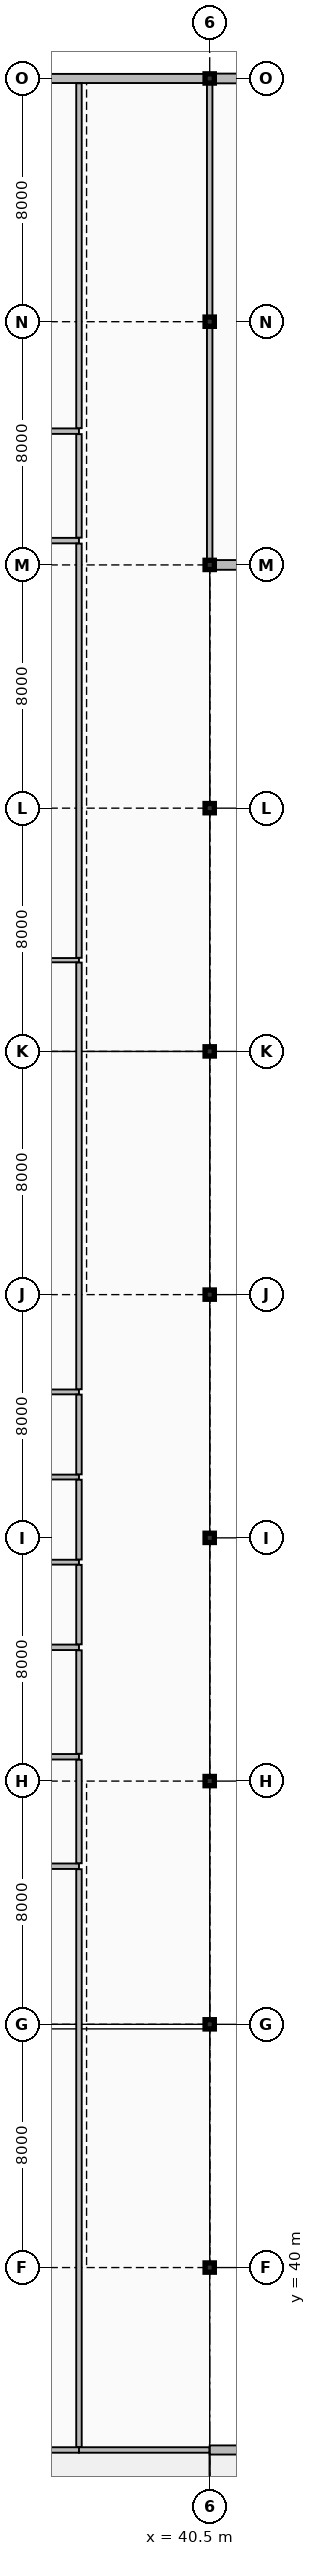
"""IFC4 building model, lengths in metres.
Left out: names, types, materials, properties, quantities, classifications, styles, units other than length and angle.
Written with IfcOpenShell. Run it as: python <this file> out.ifc"""

import sys

from ifc_helpers import new_model, si_unit, direction, frame, frame_2d, origin, origin_2d, place, context, subcontext, project, spatial, rectangle, hollow_rectangle, extrude, element, fill, save


model = new_model("IFC4")
c1 = context("Model", 3, precision=1e-05, world=origin(), true_north=direction((0.0, 1.0)))
c2 = subcontext(c1, "Body", "Model", "MODEL_VIEW")
j1 = project(units=[si_unit("LENGTHUNIT", "METRE"), si_unit("PLANEANGLEUNIT", "RADIAN")], contexts=[c1])
p1 = place(None, origin())
s1 = spatial("IfcSite", under=j1, at=p1, CompositionType="ELEMENT")
p2 = place(p1, origin())
s2 = spatial("IfcBuilding", under=s1, at=p2, CompositionType="ELEMENT")
p3 = place(p2, frame((0.0, 0.0, 19.8)))
s3 = spatial("IfcBuildingStorey", under=s2, at=p3, CompositionType="ELEMENT", Elevation=19.8)
p4 = place(p3, frame((40.5, 40.0, 0.0), z_axis=(0.0, 0.0, 1.0), x_axis=(1.0, 0.0, 0.0)))
e1 = element("IfcColumn", 1, at=p4, inside=s3, PredefinedType="COLUMN", context=c2, shape_type="SweptSolid", body=[
    extrude(hollow_rectangle(XDim=0.305, YDim=0.305, WallThickness=0.016, InnerFilletRadius=0.016, OuterFilletRadius=0.032, at=origin_2d()), origin(), (0.0, 0.0, 1.0), 4.76),
])
for number, where, z_axis, x_axis in (
    (2, (40.5, 48.0, 0.0), (0.0, 0.0, 1.0), (1.0, 0.0, 0.0)),
    (3, (40.5, 56.0, 0.0), (0.0, 0.0, 1.0), (1.0, 0.0, 0.0)),
    (4, (40.5, 64.0, 0.0), (0.0, 0.0, 1.0), (1.0, 0.0, 0.0)),
    (5, (40.5, 72.0, 0.0), (0.0, 0.0, 1.0), (1.0, 0.0, 0.0)),
    (6, (40.5, 80.0, 0.0), (0.0, 0.0, 1.0), (1.0, 0.0, 0.0)),
    (7, (40.5, 88.0, 0.0), (0.0, 0.0, 1.0), (1.0, 0.0, 0.0)),
    (8, (40.5, 96.0, 0.0), (0.0, 0.0, 1.0), (1.0, 0.0, 0.0)),
    (9, (40.5, 104.0, 0.0), (0.0, 0.0, 1.0), (1.0, 0.0, 0.0)),
    (10, (40.5, 112.0, 0.0), (0.0, 0.0, 1.0), (1.0, 0.0, 0.0)),
):
    element("IfcColumn", number, at=place(p3, frame(where, z_axis=z_axis, x_axis=x_axis)), inside=s3, PredefinedType="COLUMN", context=c2, shape_type="SweptSolid", body=[
        extrude(hollow_rectangle(XDim=0.305, YDim=0.305, WallThickness=0.016, InnerFilletRadius=0.016, OuterFilletRadius=0.032, at=origin_2d()), origin(), (0.0, 0.0, 1.0), 5.1),
    ])
p5 = place(p3, frame((48.42, 34.0, 0.0), z_axis=(0.0, 0.0, 1.0), x_axis=(-1.0, 0.0, 0.0)))
e11 = element("IfcWall", 11, at=p5, inside=s3, PredefinedType="SOLIDWALL", context=c2, shape_type="SweptSolid", body=[
    extrude(rectangle(XDim=7.92, YDim=0.3, at=frame_2d((3.96, 0.0))), origin(), (0.0, 0.0, 1.0), 4.092),
])
p6 = place(p5, frame((2.7, 0.0, 0.95)))
e12 = element("IfcOpeningElement", 12, at=p6, cuts=e11, PredefinedType="OPENING", context=c2, shape_type="SweptSolid", body=[
    extrude(rectangle(XDim=2.7, YDim=0.9, at=frame_2d((1.35, 0.45))), frame((0.0, 0.16, 0.0), z_axis=(0.0, -1.0, 0.0), x_axis=(1.0, 0.0, 0.0)), (0.0, 0.0, 1.0), 0.32),
])
p7 = place(p3, frame((40.5, 96.0, 0.0), z_axis=(0.0, 0.0, 1.0), x_axis=(1.0, 0.0, 0.0)))
e13 = element("IfcWall", 13, at=p7, inside=s3, PredefinedType="SOLIDWALL", context=c2, shape_type="SweptSolid", body=[
    extrude(rectangle(XDim=5.7, YDim=0.32, at=frame_2d((2.85, 0.0))), origin(), (0.0, 0.0, 1.0), 4.302),
])
p8 = place(p3, frame((46.2, 112.0, 0.0), z_axis=(0.0, 0.0, 1.0), x_axis=(-1.0, 0.0, 0.0)))
e14 = element("IfcWall", 14, at=p8, inside=s3, PredefinedType="SOLIDWALL", context=c2, shape_type="SweptSolid", body=[
    extrude(rectangle(XDim=5.7, YDim=0.32, at=frame_2d((2.85, 0.0))), origin(), (0.0, 0.0, 1.0), 4.389),
])
p9 = place(p8, frame((2.25, 0.0, 0.85)))
e15 = element("IfcOpeningElement", 15, at=p9, cuts=e14, PredefinedType="OPENING", context=c2, shape_type="SweptSolid", body=[
    extrude(rectangle(XDim=0.9, YDim=2.1, at=frame_2d((0.45, 1.05))), frame((0.0, 0.17, 0.0), z_axis=(0.0, -1.0, 0.0), x_axis=(1.0, 0.0, 0.0)), (0.0, 0.0, 1.0), 0.34),
])
p10 = place(p3, frame((40.5, 112.0, 0.0), z_axis=(0.0, 0.0, 1.0), x_axis=(-1.0, 0.0, 0.0)))
e16 = element("IfcWall", 16, at=p10, inside=s3, PredefinedType="SOLIDWALL", context=c2, shape_type="SweptSolid", body=[
    extrude(rectangle(XDim=12.15, YDim=0.3, at=frame_2d((6.075, 0.0))), origin(), (0.0, 0.0, 1.0), 4.302),
])
p11 = place(p10, frame((5.4, 0.0, 0.85)))
e17 = element("IfcOpeningElement", 17, at=p11, cuts=e16, PredefinedType="OPENING", context=c2, shape_type="SweptSolid", body=[
    extrude(rectangle(XDim=0.9, YDim=2.4, at=frame_2d((0.45, 1.2))), frame((0.0, 0.16, 0.0), z_axis=(0.0, -1.0, 0.0), x_axis=(1.0, 0.0, 0.0)), (0.0, 0.0, 1.0), 0.32),
])
p12 = place(p3, frame((30.347, 34.0, 0.0), z_axis=(0.0, 0.0, 1.0), x_axis=(1.0, 0.0, 0.0)))
e18 = element("IfcWall", 18, at=p12, inside=s3, PredefinedType="PARTITIONING", context=c2, shape_type="SweptSolid", body=[
    extrude(rectangle(XDim=5.853, YDim=0.18, at=frame_2d((2.926, 0.0))), origin(), (0.0, 0.0, 1.0), 4.092),
])
p13 = place(p3, frame((29.586, 53.2, 0.0), z_axis=(0.0, 0.0, 1.0), x_axis=(1.0, 0.0, 0.0)))
e19 = element("IfcWall", 19, at=p13, inside=s3, PredefinedType="PARTITIONING", context=c2, shape_type="SweptSolid", body=[
    extrude(rectangle(XDim=6.614, YDim=0.18, at=frame_2d((3.307, 0.0))), origin(), (0.0, 0.0, 1.0), 4.86),
])
p14 = place(p3, frame((29.586, 83.0, 0.0), z_axis=(0.0, 0.0, 1.0), x_axis=(1.0, 0.0, 0.0)))
e20 = element("IfcWall", 20, at=p14, inside=s3, PredefinedType="PARTITIONING", context=c2, shape_type="SweptSolid", body=[
    extrude(rectangle(XDim=6.614, YDim=0.14, at=frame_2d((3.307, 0.0))), origin(), (0.0, 0.0, 1.0), 4.86),
])
p15 = place(p3, frame((29.2, 96.8, 0.0), z_axis=(0.0, 0.0, 1.0), x_axis=(1.0, 0.0, 0.0)))
e21 = element("IfcWall", 21, at=p15, inside=s3, PredefinedType="PARTITIONING", context=c2, shape_type="SweptSolid", body=[
    extrude(rectangle(XDim=7.0, YDim=0.18, at=frame_2d((3.5, 0.0))), origin(), (0.0, 0.0, 1.0), 4.86),
])
p16 = place(p3, frame((29.45, 100.4, 0.0), z_axis=(0.0, 0.0, 1.0), x_axis=(1.0, 0.0, 0.0)))
e22 = element("IfcWall", 22, at=p16, inside=s3, PredefinedType="PARTITIONING", context=c2, shape_type="SweptSolid", body=[
    extrude(rectangle(XDim=6.75, YDim=0.18, at=frame_2d((3.375, 0.0))), origin(), (0.0, 0.0, 1.0), 4.86),
])
p17 = place(p3, frame((31.8, 56.8, 0.0), z_axis=(0.0, 0.0, 1.0), x_axis=(1.0, 0.0, 0.0)))
e23 = element("IfcWall", 23, at=p17, inside=s3, PredefinedType="PARTITIONING", context=c2, shape_type="SweptSolid", body=[
    extrude(rectangle(XDim=4.4, YDim=0.18, at=frame_2d((2.2, 0.0))), origin(), (0.0, 0.0, 1.0), 4.86),
])
p18 = place(p3, frame((32.05, 60.4, 0.0), z_axis=(0.0, 0.0, 1.0), x_axis=(1.0, 0.0, 0.0)))
e24 = element("IfcWall", 24, at=p18, inside=s3, PredefinedType="PARTITIONING", context=c2, shape_type="SweptSolid", body=[
    extrude(rectangle(XDim=4.15, YDim=0.18, at=frame_2d((2.075, 0.0))), origin(), (0.0, 0.0, 1.0), 4.86),
])
for number, where, z_axis, x_axis in (
    (25, (32.058, 63.2, 0.0), (0.0, 0.0, 1.0), (1.0, 0.0, 0.0)),
    (26, (32.058, 66.0, 0.0), (0.0, 0.0, 1.0), (1.0, 0.0, 0.0)),
):
    element("IfcWall", number, at=place(p3, frame(where, z_axis=z_axis, x_axis=x_axis)), inside=s3, PredefinedType="PARTITIONING", context=c2, shape_type="SweptSolid", body=[
        extrude(rectangle(XDim=4.142, YDim=0.16, at=frame_2d((2.071, 0.0))), origin(), (0.0, 0.0, 1.0), 4.86),
    ])
p19 = place(p3, frame((32.05, 68.8, 0.0), z_axis=(0.0, 0.0, 1.0), x_axis=(1.0, 0.0, 0.0)))
e27 = element("IfcWall", 27, at=p19, inside=s3, PredefinedType="PARTITIONING", context=c2, shape_type="SweptSolid", body=[
    extrude(rectangle(XDim=4.15, YDim=0.16, at=frame_2d((2.075, 0.0))), origin(), (0.0, 0.0, 1.0), 4.86),
])
p20 = place(p3, frame((36.2, 34.0, 0.0), z_axis=(0.0, 0.0, 1.0), x_axis=(1.0, 0.0, 0.0)))
e28 = element("IfcWall", 28, at=p20, inside=s3, PredefinedType="PARTITIONING", context=c2, shape_type="SweptSolid", body=[
    extrude(rectangle(XDim=4.29, YDim=0.18, at=frame_2d((2.145, 0.0))), origin(), (0.0, 0.0, 1.0), 4.092),
])
p21 = place(p20, frame((1.545, 0.0, 0.0)))
e29 = element("IfcOpeningElement", 29, at=p21, cuts=e28, PredefinedType="OPENING", context=c2, shape_type="SweptSolid", body=[
    extrude(rectangle(XDim=1.2, YDim=2.2, at=frame_2d((0.6, 1.1))), frame((0.0, 0.1, 0.0), z_axis=(0.0, -1.0, 0.0), x_axis=(1.0, 0.0, 0.0)), (0.0, 0.0, 1.0), 0.2),
])
p22 = place(p3, frame((36.2, 34.098, 0.0), z_axis=(0.0, 0.0, 1.0), x_axis=(0.0, 1.0, 0.0)))
e30 = element("IfcWall", 30, at=p22, inside=s3, PredefinedType="PARTITIONING", context=c2, shape_type="SweptSolid", body=[
    extrude(rectangle(XDim=19.004, YDim=0.18, at=frame_2d((9.502, 0.0))), origin(), (0.0, 0.0, 1.0), 4.405),
])
p23 = place(p22, frame((9.002, 0.0, 0.0)))
e31 = element("IfcOpeningElement", 31, at=p23, cuts=e30, PredefinedType="OPENING", context=c2, shape_type="SweptSolid", body=[
    extrude(rectangle(XDim=1.0, YDim=2.2, at=frame_2d((0.5, 1.1))), frame((0.0, 0.1, 0.0), z_axis=(0.0, -1.0, 0.0), x_axis=(1.0, 0.0, 0.0)), (0.0, 0.0, 1.0), 0.2),
])
p24 = place(p3, frame((36.2, 53.298, 0.0), z_axis=(0.0, 0.0, 1.0), x_axis=(0.0, 1.0, 0.0)))
e32 = element("IfcWall", 32, at=p24, inside=s3, PredefinedType="PARTITIONING", context=c2, shape_type="SweptSolid", body=[
    extrude(rectangle(XDim=3.404, YDim=0.18, at=frame_2d((1.702, 0.0))), origin(), (0.0, 0.0, 1.0), 4.405),
])
p25 = place(p24, frame((1.152, 0.0, 0.0)))
e33 = element("IfcOpeningElement", 33, at=p25, cuts=e32, PredefinedType="OPENING", context=c2, shape_type="SweptSolid", body=[
    extrude(rectangle(XDim=1.1, YDim=2.2, at=frame_2d((0.55, 1.1))), frame((0.0, 0.1, 0.0), z_axis=(0.0, -1.0, 0.0), x_axis=(1.0, 0.0, 0.0)), (0.0, 0.0, 1.0), 0.2),
])
p26 = place(p3, frame((36.2, 56.898, 0.0), z_axis=(0.0, 0.0, 1.0), x_axis=(0.0, 1.0, 0.0)))
e34 = element("IfcWall", 34, at=p26, inside=s3, PredefinedType="PARTITIONING", context=c2, shape_type="SweptSolid", body=[
    extrude(rectangle(XDim=3.404, YDim=0.18, at=frame_2d((1.702, 0.0))), origin(), (0.0, 0.0, 1.0), 4.86),
])
p27 = place(p26, frame((1.202, 0.0, 0.0)))
e35 = element("IfcOpeningElement", 35, at=p27, cuts=e34, PredefinedType="OPENING", context=c2, shape_type="SweptSolid", body=[
    extrude(rectangle(XDim=1.0, YDim=2.15, at=frame_2d((0.5, 1.075))), frame((0.0, 0.1, 0.0), z_axis=(0.0, -1.0, 0.0), x_axis=(1.0, 0.0, 0.0)), (0.0, 0.0, 1.0), 0.2),
])
p28 = place(p3, frame((36.2, 60.498, 0.0), z_axis=(0.0, 0.0, 1.0), x_axis=(0.0, 1.0, 0.0)))
e36 = element("IfcWall", 36, at=p28, inside=s3, PredefinedType="PARTITIONING", context=c2, shape_type="SweptSolid", body=[
    extrude(rectangle(XDim=2.614, YDim=0.18, at=frame_2d((1.307, 0.0))), origin(), (0.0, 0.0, 1.0), 4.86),
])
p29 = place(p28, frame((0.832, 0.0, 0.0)))
e37 = element("IfcOpeningElement", 37, at=p29, cuts=e36, PredefinedType="OPENING", context=c2, shape_type="SweptSolid", body=[
    extrude(rectangle(XDim=0.95, YDim=2.1, at=frame_2d((0.475, 1.05))), frame((0.0, 0.1, 0.0), z_axis=(0.0, -1.0, 0.0), x_axis=(1.0, 0.0, 0.0)), (0.0, 0.0, 1.0), 0.2),
])
p30 = place(p3, frame((36.2, 63.288, 0.0), z_axis=(0.0, 0.0, 1.0), x_axis=(0.0, 1.0, 0.0)))
e38 = element("IfcWall", 38, at=p30, inside=s3, PredefinedType="PARTITIONING", context=c2, shape_type="SweptSolid", body=[
    extrude(rectangle(XDim=2.624, YDim=0.18, at=frame_2d((1.312, 0.0))), origin(), (0.0, 0.0, 1.0), 4.86),
])
p31 = place(p30, frame((0.837, 0.0, 0.0)))
e39 = element("IfcOpeningElement", 39, at=p31, cuts=e38, PredefinedType="OPENING", context=c2, shape_type="SweptSolid", body=[
    extrude(rectangle(XDim=0.95, YDim=2.1, at=frame_2d((0.475, 1.05))), frame((0.0, 0.1, 0.0), z_axis=(0.0, -1.0, 0.0), x_axis=(1.0, 0.0, 0.0)), (0.0, 0.0, 1.0), 0.2),
])
p32 = place(p3, frame((36.2, 66.088, 0.0), z_axis=(0.0, 0.0, 1.0), x_axis=(0.0, 1.0, 0.0)))
e40 = element("IfcWall", 40, at=p32, inside=s3, PredefinedType="PARTITIONING", context=c2, shape_type="SweptSolid", body=[
    extrude(rectangle(XDim=2.624, YDim=0.18, at=frame_2d((1.312, 0.0))), origin(), (0.0, 0.0, 1.0), 4.86),
])
p33 = place(p32, frame((0.812, 0.0, 0.0)))
e41 = element("IfcOpeningElement", 41, at=p33, cuts=e40, PredefinedType="OPENING", context=c2, shape_type="SweptSolid", body=[
    extrude(rectangle(XDim=1.0, YDim=2.15, at=frame_2d((0.5, 1.075))), frame((0.0, 0.1, 0.0), z_axis=(0.0, -1.0, 0.0), x_axis=(1.0, 0.0, 0.0)), (0.0, 0.0, 1.0), 0.2),
])
p34 = place(p3, frame((36.2, 68.888, 0.0), z_axis=(0.0, 0.0, 1.0), x_axis=(0.0, 1.0, 0.0)))
e42 = element("IfcWall", 42, at=p34, inside=s3, PredefinedType="PARTITIONING", context=c2, shape_type="SweptSolid", body=[
    extrude(rectangle(XDim=14.034, YDim=0.18, at=frame_2d((7.017, 0.0))), origin(), (0.0, 0.0, 1.0), 4.445),
])
p35 = place(p34, frame((6.517, 0.0, 0.0)))
e43 = element("IfcOpeningElement", 43, at=p35, cuts=e42, PredefinedType="OPENING", context=c2, shape_type="SweptSolid", body=[
    extrude(rectangle(XDim=1.0, YDim=2.2, at=frame_2d((0.5, 1.1))), frame((0.0, 0.1, 0.0), z_axis=(0.0, -1.0, 0.0), x_axis=(1.0, 0.0, 0.0)), (0.0, 0.0, 1.0), 0.2),
])
p36 = place(p3, frame((36.2, 83.078, 0.0), z_axis=(0.0, 0.0, 1.0), x_axis=(0.0, 1.0, 0.0)))
e44 = element("IfcWall", 44, at=p36, inside=s3, PredefinedType="PARTITIONING", context=c2, shape_type="SweptSolid", body=[
    extrude(rectangle(XDim=13.624, YDim=0.18, at=frame_2d((6.812, 0.0))), origin(), (0.0, 0.0, 1.0), 4.445),
])
p37 = place(p36, frame((6.312, 0.0, 0.0)))
e45 = element("IfcOpeningElement", 45, at=p37, cuts=e44, PredefinedType="OPENING", context=c2, shape_type="SweptSolid", body=[
    extrude(rectangle(XDim=1.0, YDim=2.2, at=frame_2d((0.5, 1.1))), frame((0.0, 0.1, 0.0), z_axis=(0.0, -1.0, 0.0), x_axis=(1.0, 0.0, 0.0)), (0.0, 0.0, 1.0), 0.2),
])
p38 = place(p3, frame((36.2, 96.898, 0.0), z_axis=(0.0, 0.0, 1.0), x_axis=(0.0, 1.0, 0.0)))
e46 = element("IfcWall", 46, at=p38, inside=s3, PredefinedType="PARTITIONING", context=c2, shape_type="SweptSolid", body=[
    extrude(rectangle(XDim=3.404, YDim=0.18, at=frame_2d((1.702, 0.0))), origin(), (0.0, 0.0, 1.0), 4.445),
])
p39 = place(p38, frame((1.152, 0.0, 0.0)))
e47 = element("IfcOpeningElement", 47, at=p39, cuts=e46, PredefinedType="OPENING", context=c2, shape_type="SweptSolid", body=[
    extrude(rectangle(XDim=1.1, YDim=2.2, at=frame_2d((0.55, 1.1))), frame((0.0, 0.1, 0.0), z_axis=(0.0, -1.0, 0.0), x_axis=(1.0, 0.0, 0.0)), (0.0, 0.0, 1.0), 0.2),
])
p40 = place(p3, frame((36.2, 100.498, 0.0), z_axis=(0.0, 0.0, 1.0), x_axis=(0.0, 1.0, 0.0)))
e48 = element("IfcWall", 48, at=p40, inside=s3, PredefinedType="PARTITIONING", context=c2, shape_type="SweptSolid", body=[
    extrude(rectangle(XDim=11.344, YDim=0.18, at=frame_2d((5.672, 0.0))), origin(), (0.0, 0.0, 1.0), 4.445),
])
p41 = place(p40, frame((5.172, 0.0, 0.0)))
e49 = element("IfcOpeningElement", 49, at=p41, cuts=e48, PredefinedType="OPENING", context=c2, shape_type="SweptSolid", body=[
    extrude(rectangle(XDim=1.0, YDim=2.2, at=frame_2d((0.5, 1.1))), frame((0.0, 0.1, 0.0), z_axis=(0.0, -1.0, 0.0), x_axis=(1.0, 0.0, 0.0)), (0.0, 0.0, 1.0), 0.2),
])
p42 = place(p3, frame((40.5, 96.168, 0.0), z_axis=(0.0, 0.0, 1.0), x_axis=(0.0, 1.0, 0.0)))
e50 = element("IfcWall", 50, at=p42, inside=s3, PredefinedType="PARTITIONING", context=c2, shape_type="SweptSolid", body=[
    extrude(rectangle(XDim=7.672, YDim=0.18, at=frame_2d((3.836, 0.0))), origin(), (0.0, 0.0, 1.0), 4.389),
])
p43 = place(p42, frame((3.236, 0.0, 0.0)))
e51 = element("IfcOpeningElement", 51, at=p43, cuts=e50, PredefinedType="OPENING", context=c2, shape_type="SweptSolid", body=[
    extrude(rectangle(XDim=1.2, YDim=2.2, at=frame_2d((0.6, 1.1))), frame((0.0, 0.1, 0.0), z_axis=(0.0, -1.0, 0.0), x_axis=(1.0, 0.0, 0.0)), (0.0, 0.0, 1.0), 0.2),
])
p44 = place(p3, frame((40.5, 104.16, 0.0), z_axis=(0.0, 0.0, 1.0), x_axis=(0.0, 1.0, 0.0)))
e52 = element("IfcWall", 52, at=p44, inside=s3, PredefinedType="PARTITIONING", context=c2, shape_type="SweptSolid", body=[
    extrude(rectangle(XDim=7.672, YDim=0.18, at=frame_2d((3.836, 0.0))), origin(), (0.0, 0.0, 1.0), 4.389),
])
p45 = place(p21, frame((1.2, 0.0, 0.0), z_axis=(0.0, 0.0, 1.0), x_axis=(-1.0, 0.0, 0.0)))
e53 = element("IfcDoor", 53, at=p45, inside=s3, OperationType="SINGLE_SWING_LEFT", PredefinedType="DOOR", context=c2, shape_type="SweptSolid", body=[
    extrude(rectangle(XDim=1.2, YDim=2.2, at=frame_2d((0.6, 1.1))), frame((0.0, 0.025, 0.0), z_axis=(0.0, -1.0, 0.0), x_axis=(1.0, 0.0, 0.0)), (0.0, 0.0, 1.0), 0.05),
])
fill(e29, e53)
p46 = place(p23, origin())
e54 = element("IfcDoor", 54, at=p46, inside=s3, OperationType="SINGLE_SWING_RIGHT", PredefinedType="DOOR", context=c2, shape_type="SweptSolid", body=[
    extrude(rectangle(XDim=1.0, YDim=2.2, at=frame_2d((0.5, 1.1))), frame((0.0, 0.025, 0.0), z_axis=(0.0, -1.0, 0.0), x_axis=(1.0, 0.0, 0.0)), (0.0, 0.0, 1.0), 0.05),
])
fill(e31, e54)
p47 = place(p25, origin())
e55 = element("IfcDoor", 55, at=p47, inside=s3, OperationType="SINGLE_SWING_LEFT", PredefinedType="DOOR", context=c2, shape_type="SweptSolid", body=[
    extrude(rectangle(XDim=1.1, YDim=2.2, at=frame_2d((0.55, 1.1))), frame((0.0, 0.025, 0.0), z_axis=(0.0, -1.0, 0.0), x_axis=(1.0, 0.0, 0.0)), (0.0, 0.0, 1.0), 0.05),
])
fill(e33, e55)
p48 = place(p27, origin())
e56 = element("IfcDoor", 56, at=p48, inside=s3, OperationType="SINGLE_SWING_RIGHT", PredefinedType="DOOR", context=c2, shape_type="SweptSolid", body=[
    extrude(rectangle(XDim=1.0, YDim=2.15, at=frame_2d((0.5, 1.075))), frame((0.0, 0.025, 0.0), z_axis=(0.0, -1.0, 0.0), x_axis=(1.0, 0.0, 0.0)), (0.0, 0.0, 1.0), 0.05),
])
fill(e35, e56)
p49 = place(p29, origin())
e57 = element("IfcDoor", 57, at=p49, inside=s3, OperationType="SINGLE_SWING_LEFT", PredefinedType="DOOR", context=c2, shape_type="SweptSolid", body=[
    extrude(rectangle(XDim=0.95, YDim=2.1, at=frame_2d((0.475, 1.05))), frame((0.0, 0.025, 0.0), z_axis=(0.0, -1.0, 0.0), x_axis=(1.0, 0.0, 0.0)), (0.0, 0.0, 1.0), 0.05),
])
fill(e37, e57)
p50 = place(p31, origin())
e58 = element("IfcDoor", 58, at=p50, inside=s3, OperationType="SINGLE_SWING_RIGHT", PredefinedType="DOOR", context=c2, shape_type="SweptSolid", body=[
    extrude(rectangle(XDim=0.95, YDim=2.1, at=frame_2d((0.475, 1.05))), frame((0.0, 0.025, 0.0), z_axis=(0.0, -1.0, 0.0), x_axis=(1.0, 0.0, 0.0)), (0.0, 0.0, 1.0), 0.05),
])
fill(e39, e58)
p51 = place(p33, origin())
e59 = element("IfcDoor", 59, at=p51, inside=s3, OperationType="SINGLE_SWING_LEFT", PredefinedType="DOOR", context=c2, shape_type="SweptSolid", body=[
    extrude(rectangle(XDim=1.0, YDim=2.15, at=frame_2d((0.5, 1.075))), frame((0.0, 0.025, 0.0), z_axis=(0.0, -1.0, 0.0), x_axis=(1.0, 0.0, 0.0)), (0.0, 0.0, 1.0), 0.05),
])
fill(e41, e59)
p52 = place(p35, origin())
e60 = element("IfcDoor", 60, at=p52, inside=s3, OperationType="SINGLE_SWING_RIGHT", PredefinedType="DOOR", context=c2, shape_type="SweptSolid", body=[
    extrude(rectangle(XDim=1.0, YDim=2.2, at=frame_2d((0.5, 1.1))), frame((0.0, 0.025, 0.0), z_axis=(0.0, -1.0, 0.0), x_axis=(1.0, 0.0, 0.0)), (0.0, 0.0, 1.0), 0.05),
])
fill(e43, e60)
p53 = place(p37, origin())
e61 = element("IfcDoor", 61, at=p53, inside=s3, OperationType="SINGLE_SWING_LEFT", PredefinedType="DOOR", context=c2, shape_type="SweptSolid", body=[
    extrude(rectangle(XDim=1.0, YDim=2.2, at=frame_2d((0.5, 1.1))), frame((0.0, 0.025, 0.0), z_axis=(0.0, -1.0, 0.0), x_axis=(1.0, 0.0, 0.0)), (0.0, 0.0, 1.0), 0.05),
])
fill(e45, e61)
p54 = place(p39, origin())
e62 = element("IfcDoor", 62, at=p54, inside=s3, OperationType="SINGLE_SWING_RIGHT", PredefinedType="DOOR", context=c2, shape_type="SweptSolid", body=[
    extrude(rectangle(XDim=1.1, YDim=2.2, at=frame_2d((0.55, 1.1))), frame((0.0, 0.025, 0.0), z_axis=(0.0, -1.0, 0.0), x_axis=(1.0, 0.0, 0.0)), (0.0, 0.0, 1.0), 0.05),
])
fill(e47, e62)
p55 = place(p41, origin())
e63 = element("IfcDoor", 63, at=p55, inside=s3, OperationType="SINGLE_SWING_LEFT", PredefinedType="DOOR", context=c2, shape_type="SweptSolid", body=[
    extrude(rectangle(XDim=1.0, YDim=2.2, at=frame_2d((0.5, 1.1))), frame((0.0, 0.025, 0.0), z_axis=(0.0, -1.0, 0.0), x_axis=(1.0, 0.0, 0.0)), (0.0, 0.0, 1.0), 0.05),
])
fill(e49, e63)
p56 = place(p43, frame((1.2, 0.0, 0.0), z_axis=(0.0, 0.0, 1.0), x_axis=(-1.0, 0.0, 0.0)))
e64 = element("IfcDoor", 64, at=p56, inside=s3, OperationType="SINGLE_SWING_RIGHT", PredefinedType="DOOR", context=c2, shape_type="SweptSolid", body=[
    extrude(rectangle(XDim=1.2, YDim=2.2, at=frame_2d((0.6, 1.1))), frame((0.0, 0.025, 0.0), z_axis=(0.0, -1.0, 0.0), x_axis=(1.0, 0.0, 0.0)), (0.0, 0.0, 1.0), 0.05),
])
fill(e51, e64)
save(model, sys.argv[1])
